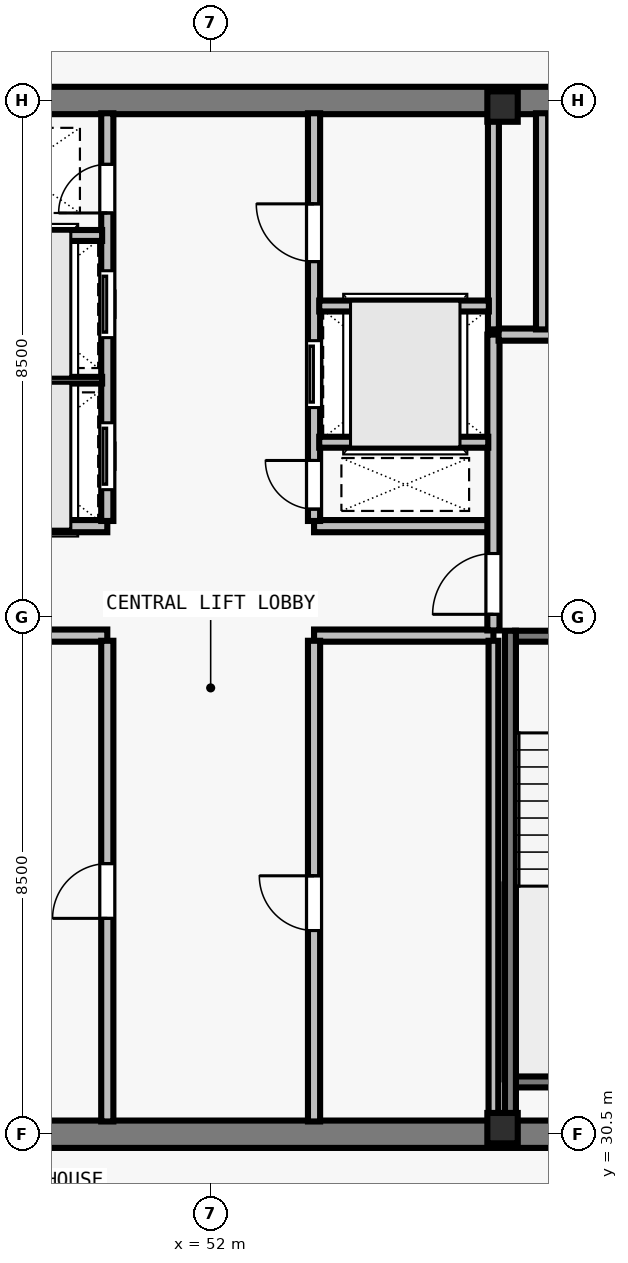
"""IFC4 building model, lengths in metres.
Left out: names, types, materials, properties, quantities, classifications, styles, units other than length and angle.
Written with IfcOpenShell. Run it as: python <this file> out.ifc"""

import sys

from ifc_helpers import new_model, si_unit, direction, frame, frame_2d, origin, origin_2d, place, context, subcontext, project, spatial, rectangle, i_section, extrude, element, fill, save


model = new_model("IFC4")
c1 = context("Model", 3, precision=1e-05, world=origin(), true_north=direction((0.0, 1.0)))
c2 = subcontext(c1, "Body", "Model", "MODEL_VIEW")
j1 = project(units=[si_unit("LENGTHUNIT", "METRE"), si_unit("PLANEANGLEUNIT", "RADIAN")], contexts=[c1])
p1 = place(None, origin())
s1 = spatial("IfcSite", under=j1, at=p1, CompositionType="ELEMENT")
p2 = place(p1, origin())
s2 = spatial("IfcBuilding", under=s1, at=p2, CompositionType="ELEMENT")
p3 = place(p2, frame((0.0, 0.0, 287.5)))
s3 = spatial("IfcBuildingStorey", under=s2, at=p3, CompositionType="ELEMENT", Elevation=287.5)
for number, where, z_axis, x_axis in (
    (1, (56.8, 30.6, 0.0), (0.0, 0.0, 1.0), (1.0, 0.0, 0.0)),
    (2, (56.8, 47.4, 0.0), (0.0, 0.0, 1.0), (1.0, 0.0, 0.0)),
):
    element("IfcColumn", number, at=place(p3, frame(where, z_axis=z_axis, x_axis=x_axis)), inside=s3, PredefinedType="COLUMN", context=c2, shape_type="SweptSolid", body=[
        extrude(i_section(OverallWidth=0.5, OverallDepth=0.5, WebThickness=0.028, FlangeThickness=0.045, at=origin_2d()), origin(), (0.0, 0.0, 1.0), 3.5),
    ])
for number, where, z_axis, x_axis in (
    (3, (43.275, 30.5, 0.0), (0.0, 0.0, 1.0), (1.0, 0.0, 0.0)),
    (4, (43.275, 47.5, 0.0), (0.0, 0.0, 1.0), (1.0, 0.0, 0.0)),
):
    element("IfcWall", number, at=place(p3, frame(where, z_axis=z_axis, x_axis=x_axis)), inside=s3, PredefinedType="SHEAR", context=c2, shape_type="SweptSolid", body=[
        extrude(rectangle(XDim=17.45, YDim=0.45, at=frame_2d((8.725, 0.0))), origin(), (0.0, 0.0, 1.0), 3.29),
    ])
for number, where, z_axis, x_axis in (
    (5, (47.35, 38.7, 0.0), (0.0, 0.0, 1.0), (1.0, 0.0, 0.0)),
    (6, (47.35, 40.5, 0.0), (0.0, 0.0, 1.0), (1.0, 0.0, 0.0)),
    (7, (53.7, 38.7, 0.0), (0.0, 0.0, 1.0), (1.0, 0.0, 0.0)),
    (8, (53.7, 40.5, 0.0), (0.0, 0.0, 1.0), (1.0, 0.0, 0.0)),
):
    element("IfcWall", number, at=place(p3, frame(where, z_axis=z_axis, x_axis=x_axis)), inside=s3, PredefinedType="SOLIDWALL", context=c2, shape_type="SweptSolid", body=[
        extrude(rectangle(XDim=2.95, YDim=0.2, at=frame_2d((1.475, 0.0))), origin(), (0.0, 0.0, 1.0), 3.29),
    ])
p4 = place(p3, frame((50.3, 30.71, 0.0), z_axis=(0.0, 0.0, 1.0), x_axis=(0.0, 1.0, 0.0)))
e9 = element("IfcWall", 9, at=p4, inside=s3, PredefinedType="SOLIDWALL", context=c2, shape_type="SweptSolid", body=[
    extrude(rectangle(XDim=7.905, YDim=0.2, at=frame_2d((3.953, 0.0))), origin(), (0.0, 0.0, 1.0), 3.29),
])
p5 = place(p4, frame((3.34, 0.0, 0.0)))
e10 = element("IfcOpeningElement", 10, at=p5, cuts=e9, PredefinedType="OPENING", context=c2, shape_type="SweptSolid", body=[
    extrude(rectangle(XDim=0.9, YDim=2.12, at=frame_2d((0.45, 1.06))), frame((0.0, 0.11, 0.0), z_axis=(0.0, -1.0, 0.0), x_axis=(1.0, 0.0, 0.0)), (0.0, 0.0, 1.0), 0.22),
])
p6 = place(p3, frame((53.7, 30.71, 0.0), z_axis=(0.0, 0.0, 1.0), x_axis=(0.0, 1.0, 0.0)))
e11 = element("IfcWall", 11, at=p6, inside=s3, PredefinedType="SOLIDWALL", context=c2, shape_type="SweptSolid", body=[
    extrude(rectangle(XDim=7.905, YDim=0.2, at=frame_2d((3.953, 0.0))), origin(), (0.0, 0.0, 1.0), 3.29),
])
p7 = place(p6, frame((3.14, 0.0, 0.0)))
e12 = element("IfcOpeningElement", 12, at=p7, cuts=e11, PredefinedType="OPENING", context=c2, shape_type="SweptSolid", body=[
    extrude(rectangle(XDim=0.9, YDim=2.12, at=frame_2d((0.45, 1.06))), frame((0.0, 0.11, 0.0), z_axis=(0.0, -1.0, 0.0), x_axis=(1.0, 0.0, 0.0)), (0.0, 0.0, 1.0), 0.22),
])
p8 = place(p3, frame((50.3, 40.585, 0.0), z_axis=(0.0, 0.0, 1.0), x_axis=(0.0, 1.0, 0.0)))
e13 = element("IfcWall", 13, at=p8, inside=s3, PredefinedType="SOLIDWALL", context=c2, shape_type="SweptSolid", body=[
    extrude(rectangle(XDim=6.705, YDim=0.2, at=frame_2d((3.353, 0.0))), origin(), (0.0, 0.0, 1.0), 3.29),
])
p9 = place(p8, frame((0.515, 0.0, 0.0)))
e14 = element("IfcOpeningElement", 14, at=p9, cuts=e13, PredefinedType="OPENING", context=c2, shape_type="SweptSolid", body=[
    extrude(rectangle(XDim=1.1, YDim=2.2, at=frame_2d((0.55, 1.1))), frame((0.0, 0.11, 0.0), z_axis=(0.0, -1.0, 0.0), x_axis=(1.0, 0.0, 0.0)), (0.0, 0.0, 1.0), 0.22),
])
p10 = place(p8, frame((3.015, 0.0, 0.0)))
e15 = element("IfcOpeningElement", 15, at=p10, cuts=e13, PredefinedType="OPENING", context=c2, shape_type="SweptSolid", body=[
    extrude(rectangle(XDim=1.1, YDim=2.2, at=frame_2d((0.55, 1.1))), frame((0.0, 0.11, 0.0), z_axis=(0.0, -1.0, 0.0), x_axis=(1.0, 0.0, 0.0)), (0.0, 0.0, 1.0), 0.22),
])
p11 = place(p8, frame((5.065, 0.0, 0.0)))
e16 = element("IfcOpeningElement", 16, at=p11, cuts=e13, PredefinedType="OPENING", context=c2, shape_type="SweptSolid", body=[
    extrude(rectangle(XDim=0.8, YDim=2.08, at=frame_2d((0.4, 1.04))), frame((0.0, 0.11, 0.0), z_axis=(0.0, -1.0, 0.0), x_axis=(1.0, 0.0, 0.0)), (0.0, 0.0, 1.0), 0.22),
])
p12 = place(p3, frame((53.7, 40.585, 0.0), z_axis=(0.0, 0.0, 1.0), x_axis=(0.0, 1.0, 0.0)))
e17 = element("IfcWall", 17, at=p12, inside=s3, PredefinedType="SOLIDWALL", context=c2, shape_type="SweptSolid", body=[
    extrude(rectangle(XDim=6.705, YDim=0.2, at=frame_2d((3.353, 0.0))), origin(), (0.0, 0.0, 1.0), 3.29),
])
p13 = place(p12, frame((0.195, 0.0, 0.0)))
e18 = element("IfcOpeningElement", 18, at=p13, cuts=e17, PredefinedType="OPENING", context=c2, shape_type="SweptSolid", body=[
    extrude(rectangle(XDim=0.8, YDim=2.08, at=frame_2d((0.4, 1.04))), frame((0.0, 0.11, 0.0), z_axis=(0.0, -1.0, 0.0), x_axis=(1.0, 0.0, 0.0)), (0.0, 0.0, 1.0), 0.22),
])
p14 = place(p12, frame((1.865, 0.0, 0.0)))
e19 = element("IfcOpeningElement", 19, at=p14, cuts=e17, PredefinedType="OPENING", context=c2, shape_type="SweptSolid", body=[
    extrude(rectangle(XDim=1.1, YDim=2.2, at=frame_2d((0.55, 1.1))), frame((0.0, 0.11, 0.0), z_axis=(0.0, -1.0, 0.0), x_axis=(1.0, 0.0, 0.0)), (0.0, 0.0, 1.0), 0.22),
])
p15 = place(p12, frame((4.265, 0.0, 0.0)))
e20 = element("IfcOpeningElement", 20, at=p15, cuts=e17, PredefinedType="OPENING", context=c2, shape_type="SweptSolid", body=[
    extrude(rectangle(XDim=0.95, YDim=2.12, at=frame_2d((0.475, 1.06))), frame((0.0, 0.11, 0.0), z_axis=(0.0, -1.0, 0.0), x_axis=(1.0, 0.0, 0.0)), (0.0, 0.0, 1.0), 0.22),
])
p16 = place(p3, frame((56.65, 38.785, 0.0), z_axis=(0.0, 0.0, 1.0), x_axis=(0.0, 1.0, 0.0)))
e21 = element("IfcWall", 21, at=p16, inside=s3, PredefinedType="SOLIDWALL", context=c2, shape_type="SweptSolid", body=[
    extrude(rectangle(XDim=4.865, YDim=0.2, at=frame_2d((2.433, 0.0))), origin(), (0.0, 0.0, 1.0), 3.29),
])
p17 = place(p16, frame((0.265, 0.0, 0.0)))
e22 = element("IfcOpeningElement", 22, at=p17, cuts=e21, PredefinedType="OPENING", context=c2, shape_type="SweptSolid", body=[
    extrude(rectangle(XDim=1.0, YDim=2.15, at=frame_2d((0.5, 1.075))), frame((0.0, 0.11, 0.0), z_axis=(0.0, -1.0, 0.0), x_axis=(1.0, 0.0, 0.0)), (0.0, 0.0, 1.0), 0.22),
])
p18 = place(p3, frame((56.735, 43.65, 0.0), z_axis=(0.0, 0.0, 1.0), x_axis=(1.0, 0.0, 0.0)))
e23 = element("IfcWall", 23, at=p18, inside=s3, PredefinedType="SOLIDWALL", context=c2, shape_type="SweptSolid", body=[
    extrude(rectangle(XDim=3.555, YDim=0.2, at=frame_2d((1.777, 0.0))), origin(), (0.0, 0.0, 1.0), 3.29),
])
p19 = place(p18, frame((1.295, 0.0, 0.0)))
e24 = element("IfcOpeningElement", 24, at=p19, cuts=e23, PredefinedType="OPENING", context=c2, shape_type="SweptSolid", body=[
    extrude(rectangle(XDim=1.1, YDim=2.2, at=frame_2d((0.55, 1.1))), frame((0.0, 0.11, 0.0), z_axis=(0.0, -1.0, 0.0), x_axis=(1.0, 0.0, 0.0)), (0.0, 0.0, 1.0), 0.22),
])
p20 = place(p3, frame((57.45, 43.735, 0.0), z_axis=(0.0, 0.0, 1.0), x_axis=(0.0, 1.0, 0.0)))
e25 = element("IfcWall", 25, at=p20, inside=s3, PredefinedType="SOLIDWALL", context=c2, shape_type="SweptSolid", body=[
    extrude(rectangle(XDim=3.555, YDim=0.2, at=frame_2d((1.777, 0.0))), origin(), (0.0, 0.0, 1.0), 3.29),
])
p21 = place(p3, frame((56.65, 30.71, 0.0), z_axis=(0.0, 0.0, 1.0), x_axis=(0.0, 1.0, 0.0)))
e26 = element("IfcWall", 26, at=p21, inside=s3, PredefinedType="PARTITIONING", context=c2, shape_type="SweptSolid", body=[
    extrude(rectangle(XDim=7.905, YDim=0.16, at=frame_2d((3.953, 0.0))), origin(), (0.0, 0.0, 1.0), 3.29),
])
p22 = place(p3, frame((47.435, 42.9, 0.0), z_axis=(0.0, 0.0, 1.0), x_axis=(1.0, 0.0, 0.0)))
e27 = element("IfcWall", 27, at=p22, inside=s3, PredefinedType="PARTITIONING", context=c2, shape_type="SweptSolid", body=[
    extrude(rectangle(XDim=2.78, YDim=0.11, at=frame_2d((1.39, 0.0))), origin(), (0.0, 0.0, 1.0), 3.29),
])
p23 = place(p3, frame((47.425, 45.28, 0.0), z_axis=(0.0, 0.0, 1.0), x_axis=(1.0, 0.0, 0.0)))
e28 = element("IfcWall", 28, at=p23, inside=s3, PredefinedType="SOLIDWALL", context=c2, shape_type="SweptSolid", body=[
    extrude(rectangle(XDim=2.79, YDim=0.18, at=frame_2d((1.395, 0.0))), origin(), (0.0, 0.0, 1.0), 3.29),
])
p24 = place(p3, frame((56.65, 43.735, 0.0), z_axis=(0.0, 0.0, 1.0), x_axis=(0.0, 1.0, 0.0)))
e29 = element("IfcWall", 29, at=p24, inside=s3, PredefinedType="SOLIDWALL", context=c2, shape_type="SweptSolid", body=[
    extrude(rectangle(XDim=3.555, YDim=0.18, at=frame_2d((1.777, 0.0))), origin(), (0.0, 0.0, 1.0), 3.29),
])
p25 = place(p3, frame((53.785, 41.88, 0.0), z_axis=(0.0, 0.0, 1.0), x_axis=(1.0, 0.0, 0.0)))
e30 = element("IfcWall", 30, at=p25, inside=s3, PredefinedType="SOLIDWALL", context=c2, shape_type="SweptSolid", body=[
    extrude(rectangle(XDim=2.78, YDim=0.18, at=frame_2d((1.39, 0.0))), origin(), (0.0, 0.0, 1.0), 3.29),
])
p26 = place(p3, frame((53.785, 44.12, 0.0), z_axis=(0.0, 0.0, 1.0), x_axis=(1.0, 0.0, 0.0)))
e31 = element("IfcWall", 31, at=p26, inside=s3, PredefinedType="SOLIDWALL", context=c2, shape_type="SweptSolid", body=[
    extrude(rectangle(XDim=2.79, YDim=0.18, at=frame_2d((1.395, 0.0))), origin(), (0.0, 0.0, 1.0), 3.29),
])
p27 = place(p3, frame((57.005, 38.69, 0.0), z_axis=(0.0, 0.0, 1.0), x_axis=(1.0, 0.0, 0.0)))
e32 = element("IfcWall", 32, at=p27, inside=s3, PredefinedType="SOLIDWALL", context=c2, shape_type="SweptSolid", body=[
    extrude(rectangle(XDim=3.28, YDim=0.18, at=frame_2d((1.64, 0.0))), origin(), (0.0, 0.0, 1.0), 3.29),
])
p28 = place(p27, frame((1.165, 0.0, 0.0)))
e33 = element("IfcOpeningElement", 33, at=p28, cuts=e32, PredefinedType="OPENING", context=c2, shape_type="SweptSolid", body=[
    extrude(rectangle(XDim=0.95, YDim=2.15, at=frame_2d((0.475, 1.075))), frame((0.0, 0.1, 0.0), z_axis=(0.0, -1.0, 0.0), x_axis=(1.0, 0.0, 0.0)), (0.0, 0.0, 1.0), 0.2),
])
p29 = place(p3, frame((57.005, 31.36, 0.0), z_axis=(0.0, 0.0, 1.0), x_axis=(1.0, 0.0, 0.0)))
e34 = element("IfcWall", 34, at=p29, inside=s3, PredefinedType="SOLIDWALL", context=c2, shape_type="SweptSolid", body=[
    extrude(rectangle(XDim=3.28, YDim=0.18, at=frame_2d((1.64, 0.0))), origin(), (0.0, 0.0, 1.0), 3.29),
])
p30 = place(p3, frame((56.93, 38.78, 0.0), z_axis=(0.0, 0.0, 1.0), x_axis=(0.0, -1.0, 0.0)))
e35 = element("IfcWall", 35, at=p30, inside=s3, PredefinedType="SOLIDWALL", context=c2, shape_type="SweptSolid", body=[
    extrude(rectangle(XDim=8.067, YDim=0.18, at=frame_2d((4.034, 0.0))), origin(), (0.0, 0.0, 1.0), 3.29),
])
p31 = place(p17, origin())
e36 = element("IfcDoor", 36, at=p31, inside=s3, OperationType="SINGLE_SWING_LEFT", PredefinedType="DOOR", context=c2, shape_type="SweptSolid", body=[
    extrude(rectangle(XDim=1.0, YDim=2.15, at=frame_2d((0.5, 1.075))), frame((0.0, 0.025, 0.0), z_axis=(0.0, -1.0, 0.0), x_axis=(1.0, 0.0, 0.0)), (0.0, 0.0, 1.0), 0.05),
])
fill(e22, e36)
p32 = place(p5, origin())
e37 = element("IfcDoor", 37, at=p32, inside=s3, OperationType="SINGLE_SWING_LEFT", PredefinedType="DOOR", context=c2, shape_type="SweptSolid", body=[
    extrude(rectangle(XDim=0.9, YDim=2.12, at=frame_2d((0.45, 1.06))), frame((0.0, 0.025, 0.0), z_axis=(0.0, -1.0, 0.0), x_axis=(1.0, 0.0, 0.0)), (0.0, 0.0, 1.0), 0.05),
])
fill(e10, e37)
p33 = place(p7, origin())
e38 = element("IfcDoor", 38, at=p33, inside=s3, OperationType="SINGLE_SWING_RIGHT", PredefinedType="DOOR", context=c2, shape_type="SweptSolid", body=[
    extrude(rectangle(XDim=0.9, YDim=2.12, at=frame_2d((0.45, 1.06))), frame((0.0, 0.025, 0.0), z_axis=(0.0, -1.0, 0.0), x_axis=(1.0, 0.0, 0.0)), (0.0, 0.0, 1.0), 0.05),
])
fill(e12, e38)
p34 = place(p9, origin())
e39 = element("IfcDoor", 39, at=p34, inside=s3, OperationType="SLIDING_TO_LEFT", PredefinedType="DOOR", context=c2, shape_type="SweptSolid", body=[
    extrude(rectangle(XDim=1.1, YDim=2.2, at=frame_2d((0.55, 1.1))), frame((0.0, 0.025, 0.0), z_axis=(0.0, -1.0, 0.0), x_axis=(1.0, 0.0, 0.0)), (0.0, 0.0, 1.0), 0.05),
])
fill(e14, e39)
p35 = place(p10, origin())
e40 = element("IfcDoor", 40, at=p35, inside=s3, OperationType="SLIDING_TO_LEFT", PredefinedType="DOOR", context=c2, shape_type="SweptSolid", body=[
    extrude(rectangle(XDim=1.1, YDim=2.2, at=frame_2d((0.55, 1.1))), frame((0.0, 0.025, 0.0), z_axis=(0.0, -1.0, 0.0), x_axis=(1.0, 0.0, 0.0)), (0.0, 0.0, 1.0), 0.05),
])
fill(e15, e40)
p36 = place(p11, origin())
e41 = element("IfcDoor", 41, at=p36, inside=s3, OperationType="SINGLE_SWING_LEFT", PredefinedType="DOOR", context=c2, shape_type="SweptSolid", body=[
    extrude(rectangle(XDim=0.8, YDim=2.08, at=frame_2d((0.4, 1.04))), frame((0.0, 0.025, 0.0), z_axis=(0.0, -1.0, 0.0), x_axis=(1.0, 0.0, 0.0)), (0.0, 0.0, 1.0), 0.05),
])
fill(e16, e41)
p37 = place(p13, origin())
e42 = element("IfcDoor", 42, at=p37, inside=s3, OperationType="SINGLE_SWING_RIGHT", PredefinedType="DOOR", context=c2, shape_type="SweptSolid", body=[
    extrude(rectangle(XDim=0.8, YDim=2.08, at=frame_2d((0.4, 1.04))), frame((0.0, 0.025, 0.0), z_axis=(0.0, -1.0, 0.0), x_axis=(1.0, 0.0, 0.0)), (0.0, 0.0, 1.0), 0.05),
])
fill(e18, e42)
p38 = place(p14, origin())
e43 = element("IfcDoor", 43, at=p38, inside=s3, OperationType="SLIDING_TO_LEFT", PredefinedType="DOOR", context=c2, shape_type="SweptSolid", body=[
    extrude(rectangle(XDim=1.1, YDim=2.2, at=frame_2d((0.55, 1.1))), frame((0.0, 0.025, 0.0), z_axis=(0.0, -1.0, 0.0), x_axis=(1.0, 0.0, 0.0)), (0.0, 0.0, 1.0), 0.05),
])
fill(e19, e43)
p39 = place(p15, origin())
e44 = element("IfcDoor", 44, at=p39, inside=s3, OperationType="SINGLE_SWING_RIGHT", PredefinedType="DOOR", context=c2, shape_type="SweptSolid", body=[
    extrude(rectangle(XDim=0.95, YDim=2.12, at=frame_2d((0.475, 1.06))), frame((0.0, 0.025, 0.0), z_axis=(0.0, -1.0, 0.0), x_axis=(1.0, 0.0, 0.0)), (0.0, 0.0, 1.0), 0.05),
])
fill(e20, e44)
save(model, sys.argv[1])
